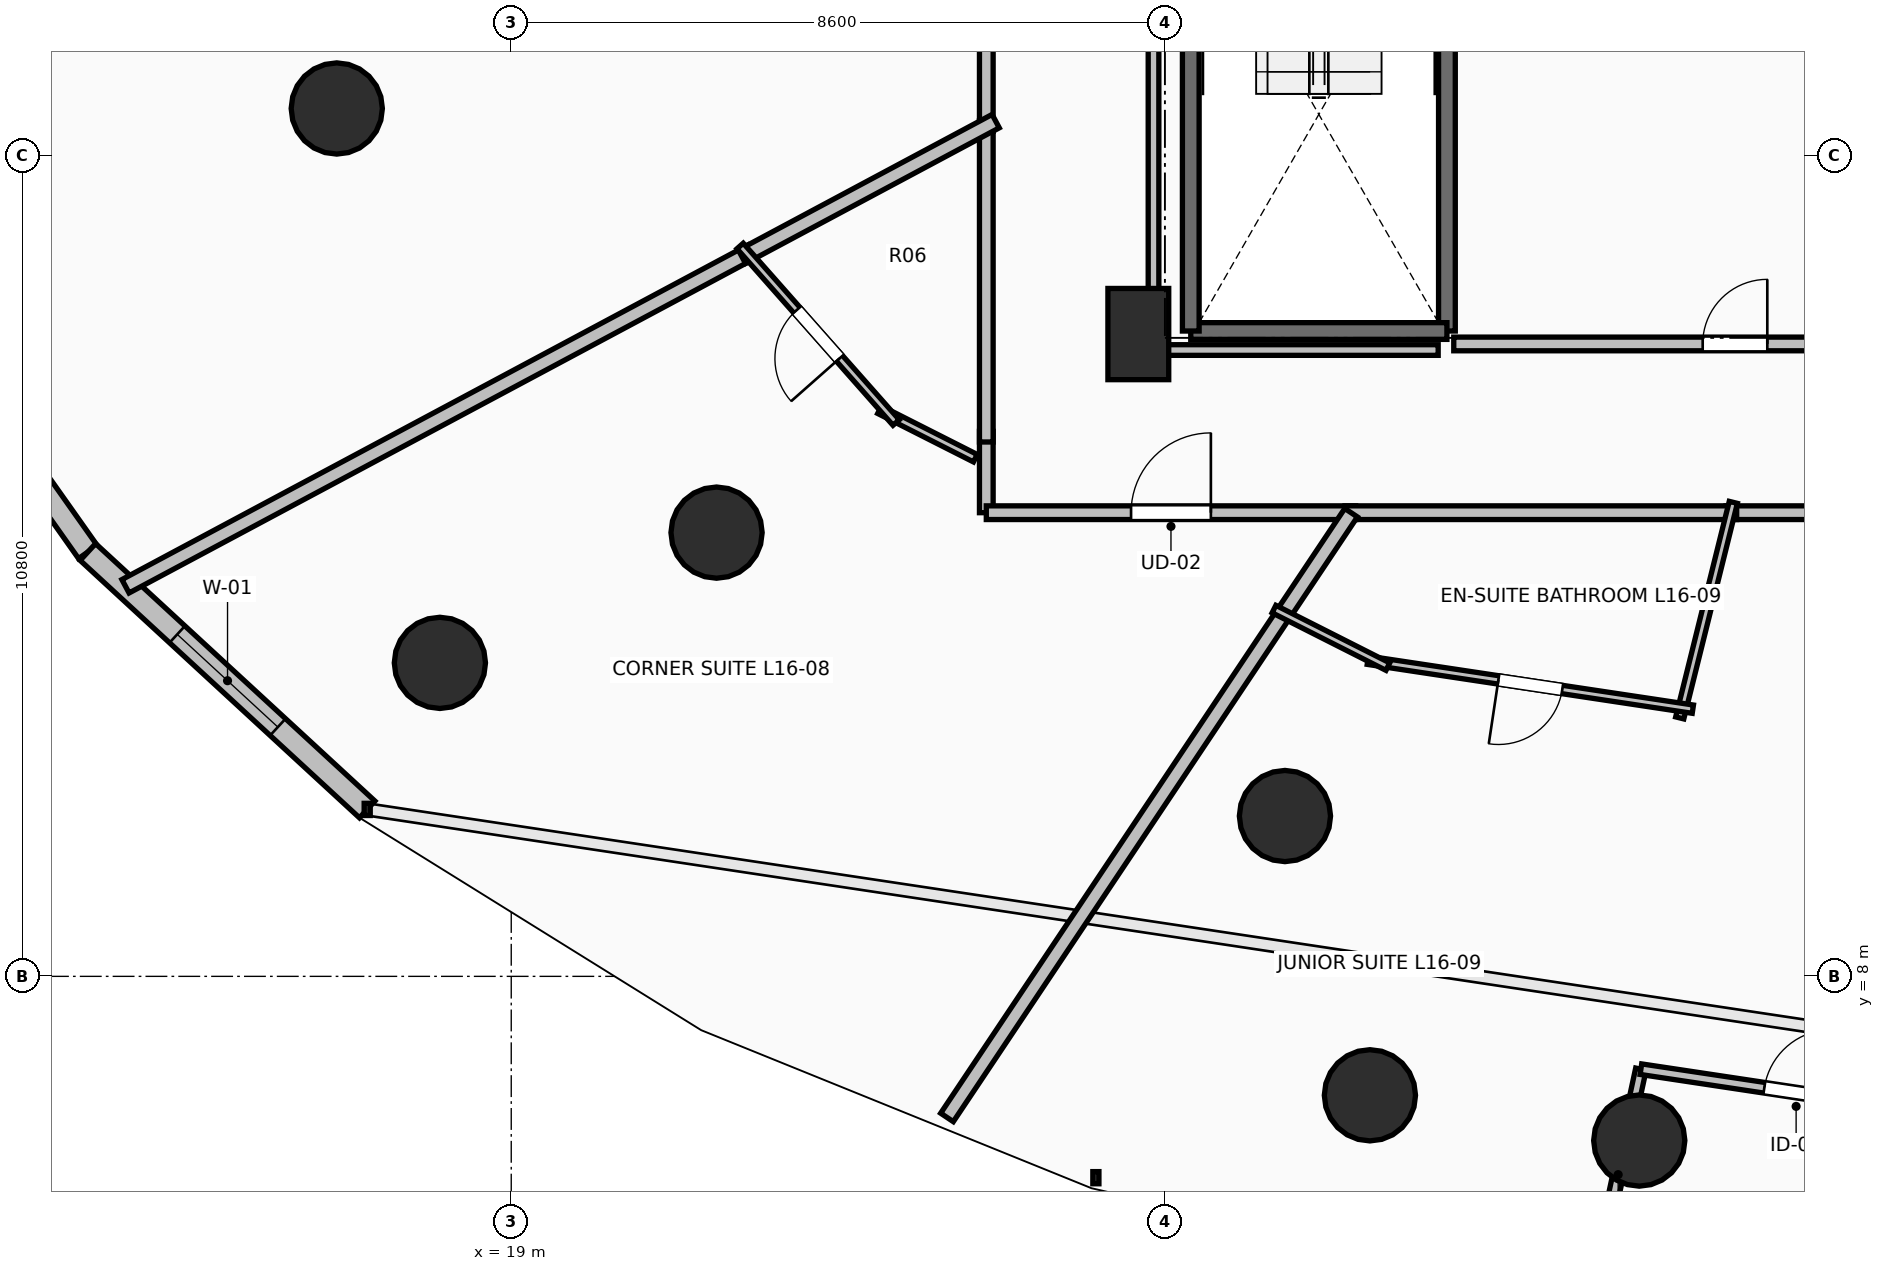
"""IFC4 building model, lengths in metres.
Left out: names, types, materials, properties, quantities, classifications, styles, units other than length and angle.
Written with IfcOpenShell. Run it as: python <this file> out.ifc"""

import sys

from ifc_helpers import new_model, si_unit, direction, frame, frame_2d, origin, origin_2d, place, context, subcontext, project, spatial, rectangle, circle, extrude, element, fill, save


model = new_model("IFC4")
c1 = context("Model", 3, precision=1e-05, world=origin(), true_north=direction((0.0, 1.0)))
c2 = subcontext(c1, "Body", "Model", "MODEL_VIEW")
j1 = project(units=[si_unit("LENGTHUNIT", "METRE"), si_unit("PLANEANGLEUNIT", "RADIAN")], contexts=[c1])
p1 = place(None, origin())
s1 = spatial("IfcSite", under=j1, at=p1, CompositionType="ELEMENT")
p2 = place(p1, origin())
s2 = spatial("IfcBuilding", under=s1, at=p2, CompositionType="ELEMENT")
p3 = place(p2, frame((0.0, 0.0, 62.5)))
s3 = spatial("IfcBuildingStorey", under=s2, at=p3, CompositionType="ELEMENT", Elevation=62.5)
for number, where, z_axis, x_axis in (
    (1, (16.705, 19.418, 0.0), (0.0, 0.0, 1.0), (-0.924, -0.383, 0.0)),
    (2, (21.701, 13.838, 0.0), (0.0, 0.0, 1.0), (-0.707, -0.707, 0.0)),
    (3, (29.179, 10.109, 0.0), (0.0, 0.0, 1.0), (-0.383, -0.924, 0.0)),
    (4, (18.061, 12.124, 0.0), (0.0, 0.0, 1.0), (-0.707, -0.707, 0.0)),
    (5, (30.297, 6.435, 0.0), (0.0, 0.0, 1.0), (-0.383, -0.924, 0.0)),
    (6, (33.84, 5.84, 0.0), (0.0, 0.0, 1.0), (0.0, -1.0, 0.0)),
):
    element("IfcColumn", number, at=place(p3, frame(where, z_axis=z_axis, x_axis=x_axis)), inside=s3, PredefinedType="COLUMN", context=c2, shape_type="SweptSolid", body=[
        extrude(circle(Radius=0.6, at=origin_2d()), origin(), (0.0, 0.0, 1.0), 3.5),
    ])
p4 = place(p3, frame((27.25, 16.45, 0.0), z_axis=(0.0, 0.0, 1.0), x_axis=(1.0, 0.0, 0.0)))
e7 = element("IfcColumn", 7, at=p4, inside=s3, PredefinedType="PILASTER", context=c2, shape_type="SweptSolid", body=[
    extrude(rectangle(XDim=0.8, YDim=1.2, at=origin_2d()), origin(), (0.0, 0.0, 1.0), 3.5),
])
p5 = place(p3, frame((10.699, 17.447, 0.0), z_axis=(0.0, 0.0, 1.0), x_axis=(0.577130815624, -0.816651713803, 0.0)))
e8 = element("IfcWall", 8, at=p5, inside=s3, PredefinedType="STANDARD", context=c2, shape_type="SweptSolid", body=[
    extrude(rectangle(XDim=4.731, YDim=0.3, at=frame_2d((2.366, 0.0))), origin(), (0.0, 0.0, 1.0), 3.24),
])
p6 = place(p3, frame((13.43, 13.583, 0.0), z_axis=(0.0, 0.0, 1.0), x_axis=(0.735342629635, -0.677695519419, 0.0)))
e9 = element("IfcWall", 9, at=p6, inside=s3, PredefinedType="STANDARD", context=c2, shape_type="SweptSolid", body=[
    extrude(rectangle(XDim=4.997, YDim=0.3, at=frame_2d((2.499, 0.0))), origin(), (0.0, 0.0, 1.0), 3.24),
])
p7 = place(p6, frame((1.599, 0.0, 0.85)))
e10 = element("IfcOpeningElement", 10, at=p7, cuts=e9, PredefinedType="OPENING", context=c2, shape_type="SweptSolid", body=[
    extrude(rectangle(XDim=1.8, YDim=2.19, at=frame_2d((0.9, 1.095))), frame((0.0, 0.165, 0.0), z_axis=(0.0, -1.0, 0.0), x_axis=(1.0, 0.0, 0.0)), (0.0, 0.0, 1.0), 0.33),
])
p8 = place(p3, frame((31.31, 23.91, 0.0), z_axis=(0.0, 0.0, 1.0), x_axis=(0.0, -1.0, 0.0)))
e11 = element("IfcWall", 11, at=p8, inside=s3, PredefinedType="SOLIDWALL", context=c2, shape_type="SweptSolid", body=[
    extrude(rectangle(XDim=7.42, YDim=0.22, at=frame_2d((3.71, 0.0))), origin(), (0.0, 0.0, 1.0), 3.24),
])
p9 = place(p3, frame((31.31, 16.49, 0.0), z_axis=(0.0, 0.0, 1.0), x_axis=(-1.0, 0.0, 0.0)))
e12 = element("IfcWall", 12, at=p9, inside=s3, PredefinedType="SOLIDWALL", context=c2, shape_type="SweptSolid", body=[
    extrude(rectangle(XDim=3.37, YDim=0.22, at=frame_2d((1.685, 0.0))), origin(), (0.0, 0.0, 1.0), 3.24),
])
p10 = place(p3, frame((27.94, 16.49, 0.0), z_axis=(0.0, 0.0, 1.0), x_axis=(0.0, 1.0, 0.0)))
e13 = element("IfcWall", 13, at=p10, inside=s3, PredefinedType="SOLIDWALL", context=c2, shape_type="SweptSolid", body=[
    extrude(rectangle(XDim=7.42, YDim=0.22, at=frame_2d((3.71, 0.0))), origin(), (0.0, 0.0, 1.0), 3.24),
])
p11 = place(p3, frame((31.4, 16.32, 0.0), z_axis=(0.0, 0.0, 1.0), x_axis=(1.0, 0.0, 0.0)))
e14 = element("IfcWall", 14, at=p11, inside=s3, PredefinedType="PARTITIONING", context=c2, shape_type="SweptSolid", body=[
    extrude(rectangle(XDim=7.4, YDim=0.18, at=frame_2d((3.7, 0.0))), origin(), (0.0, 0.0, 1.0), 3.24),
])
p12 = place(p11, frame((3.275, 0.0, 0.0)))
e15 = element("IfcOpeningElement", 15, at=p12, cuts=e14, PredefinedType="OPENING", context=c2, shape_type="SweptSolid", body=[
    extrude(rectangle(XDim=0.85, YDim=2.1, at=frame_2d((0.425, 1.05))), frame((0.0, 0.105, 0.0), z_axis=(0.0, -1.0, 0.0), x_axis=(1.0, 0.0, 0.0)), (0.0, 0.0, 1.0), 0.21),
])
p13 = place(p3, frame((25.25, 23.263, 0.0), z_axis=(0.0, 0.0, 1.0), x_axis=(0.0, -1.0, 0.0)))
e16 = element("IfcWall", 16, at=p13, inside=s3, PredefinedType="PARTITIONING", context=c2, shape_type="SweptSolid", body=[
    extrude(rectangle(XDim=4.146, YDim=0.18, at=frame_2d((2.073, 0.0))), origin(), (0.0, 0.0, 1.0), 3.24),
])
p14 = place(p13, frame((1.548, 0.0, 0.0)))
e17 = element("IfcOpeningElement", 17, at=p14, cuts=e16, PredefinedType="OPENING", context=c2, shape_type="SweptSolid", body=[
    extrude(rectangle(XDim=1.05, YDim=2.2, at=frame_2d((0.525, 1.1))), frame((0.0, 0.105, 0.0), z_axis=(0.0, -1.0, 0.0), x_axis=(1.0, 0.0, 0.0)), (0.0, 0.0, 1.0), 0.21),
])
p15 = place(p3, frame((25.25, 15.17, 0.0), z_axis=(0.0, 0.0, 1.0), x_axis=(0.0, -1.0, 0.0)))
e18 = element("IfcWall", 18, at=p15, inside=s3, PredefinedType="PARTITIONING", context=c2, shape_type="SweptSolid", body=[
    extrude(rectangle(XDim=1.07, YDim=0.18, at=frame_2d((0.535, 0.0))), origin(), (0.0, 0.0, 1.0), 2.874),
])
p16 = place(p3, frame((25.25, 14.1, 0.0), z_axis=(0.0, 0.0, 1.0), x_axis=(1.0, 0.0, 0.0)))
e19 = element("IfcWall", 19, at=p16, inside=s3, PredefinedType="PARTITIONING", context=c2, shape_type="SweptSolid", body=[
    extrude(rectangle(XDim=4.859, YDim=0.18, at=frame_2d((2.429, 0.0))), origin(), (0.0, 0.0, 1.0), 2.432),
])
p17 = place(p16, frame((1.905, 0.0, 0.0)))
e20 = element("IfcOpeningElement", 20, at=p17, cuts=e19, PredefinedType="OPENING", context=c2, shape_type="SweptSolid", body=[
    extrude(rectangle(XDim=1.05, YDim=2.2, at=frame_2d((0.525, 1.1))), frame((0.0, 0.105, 0.0), z_axis=(0.0, -1.0, 0.0), x_axis=(1.0, 0.0, 0.0)), (0.0, 0.0, 1.0), 0.21),
])
p18 = place(p3, frame((25.25, 19.257, 0.0), z_axis=(0.0, 0.0, 1.0), x_axis=(0.0, -1.0, 0.0)))
e21 = element("IfcWall", 21, at=p18, inside=s3, PredefinedType="PARTITIONING", context=c2, shape_type="SweptSolid", body=[
    extrude(rectangle(XDim=4.227, YDim=0.18, at=frame_2d((2.114, 0.0))), origin(), (0.0, 0.0, 1.0), 2.432),
])
p19 = place(p3, frame((34.982, 14.1, 0.0), z_axis=(0.0, 0.0, 1.0), x_axis=(1.0, 0.0, 0.0)))
e22 = element("IfcWall", 22, at=p19, inside=s3, PredefinedType="PARTITIONING", context=c2, shape_type="SweptSolid", body=[
    extrude(rectangle(XDim=5.446, YDim=0.18, at=frame_2d((2.723, 0.0))), origin(), (0.0, 0.0, 1.0), 3.24),
])
p20 = place(p19, frame((2.198, 0.0, 0.0)))
e23 = element("IfcOpeningElement", 23, at=p20, cuts=e22, PredefinedType="OPENING", context=c2, shape_type="SweptSolid", body=[
    extrude(rectangle(XDim=1.05, YDim=2.2, at=frame_2d((0.525, 1.1))), frame((0.0, 0.105, 0.0), z_axis=(0.0, -1.0, 0.0), x_axis=(1.0, 0.0, 0.0)), (0.0, 0.0, 1.0), 0.21),
])
p21 = place(p3, frame((29.969, 14.1, 0.0), z_axis=(0.0, 0.0, 1.0), x_axis=(1.0, 0.0, 0.0)))
e24 = element("IfcWall", 24, at=p21, inside=s3, PredefinedType="PARTITIONING", context=c2, shape_type="SweptSolid", body=[
    extrude(rectangle(XDim=5.153, YDim=0.18, at=frame_2d((2.577, 0.0))), origin(), (0.0, 0.0, 1.0), 3.24),
])
p22 = place(p3, frame((13.925, 13.132, 0.0), z_axis=(0.0, 0.0, 1.0), x_axis=(0.881931293807, 0.471377972548, 0.0)))
e25 = element("IfcWall", 25, at=p22, inside=s3, PredefinedType="PARTITIONING", context=c2, shape_type="SweptSolid", body=[
    extrude(rectangle(XDim=9.336, YDim=0.2, at=frame_2d((4.668, 0.0))), origin(), (0.0, 0.0, 1.0), 2.624),
])
p23 = place(p3, frame((22.036, 17.467, 0.0), z_axis=(0.0, 0.0, 1.0), x_axis=(0.881916873027, 0.471404952317, 0.0)))
e26 = element("IfcWall", 26, at=p23, inside=s3, PredefinedType="PARTITIONING", context=c2, shape_type="SweptSolid", body=[
    extrude(rectangle(XDim=3.785, YDim=0.2, at=frame_2d((1.893, 0.0))), origin(), (0.0, 0.0, 1.0), 2.432),
])
p24 = place(p3, frame((25.106, 14.817, 0.0), z_axis=(0.0, 0.0, 1.0), x_axis=(-0.892342346526, 0.451359210161, 0.0)))
e27 = element("IfcWall", 27, at=p24, inside=s3, PredefinedType="PARTITIONING", context=c2, shape_type="SweptSolid", body=[
    extrude(rectangle(XDim=1.412, YDim=0.11, at=frame_2d((0.706, 0.0))), origin(), (0.0, 0.0, 1.0), 2.432),
])
p25 = place(p3, frame((24.064, 15.286, 0.0), z_axis=(0.0, 0.0, 1.0), x_axis=(-0.662165912504, 0.749357260802, 0.0)))
e28 = element("IfcWall", 28, at=p25, inside=s3, PredefinedType="PARTITIONING", context=c2, shape_type="SweptSolid", body=[
    extrude(rectangle(XDim=3.1, YDim=0.11, at=frame_2d((1.55, 0.0))), origin(), (0.0, 0.0, 1.0), 2.874),
])
p26 = place(p25, frame((1.125, 0.0, 0.0)))
e29 = element("IfcOpeningElement", 29, at=p26, cuts=e28, PredefinedType="OPENING", context=c2, shape_type="SweptSolid", body=[
    extrude(rectangle(XDim=0.85, YDim=2.1, at=frame_2d((0.425, 1.05))), frame((0.0, 0.07, 0.0), z_axis=(0.0, -1.0, 0.0), x_axis=(1.0, 0.0, 0.0)), (0.0, 0.0, 1.0), 0.14),
])
p27 = place(p3, frame((24.733, 6.144, 0.0), z_axis=(0.0, 0.0, 1.0), x_axis=(0.555577192504, 0.831464962082, 0.0)))
e30 = element("IfcWall", 30, at=p27, inside=s3, PredefinedType="PARTITIONING", context=c2, shape_type="SweptSolid", body=[
    extrude(rectangle(XDim=9.569, YDim=0.2, at=frame_2d((4.784, 0.0))), origin(), (0.0, 0.0, 1.0), 2.432),
])
p28 = place(p3, frame((35.078, 14.236, 0.0), z_axis=(0.0, 0.0, 1.0), x_axis=(-0.241139515231, -0.97049046064, 0.0)))
e31 = element("IfcWall", 31, at=p28, inside=s3, PredefinedType="PARTITIONING", context=c2, shape_type="SweptSolid", body=[
    extrude(rectangle(XDim=2.922, YDim=0.11, at=frame_2d((1.461, 0.0))), origin(), (0.0, 0.0, 1.0), 2.874),
])
p29 = place(p3, frame((34.545, 11.515, 0.0), z_axis=(0.0, 0.0, 1.0), x_axis=(-0.98886251361, 0.148831882259, 0.0)))
e32 = element("IfcWall", 32, at=p29, inside=s3, PredefinedType="PARTITIONING", context=c2, shape_type="SweptSolid", body=[
    extrude(rectangle(XDim=4.324, YDim=0.11, at=frame_2d((2.162, 0.0))), origin(), (0.0, 0.0, 1.0), 3.24),
])
p30 = place(p29, frame((1.737, 0.0, 0.0)))
e33 = element("IfcOpeningElement", 33, at=p30, cuts=e32, PredefinedType="OPENING", context=c2, shape_type="SweptSolid", body=[
    extrude(rectangle(XDim=0.85, YDim=2.1, at=frame_2d((0.425, 1.05))), frame((0.0, 0.07, 0.0), z_axis=(0.0, -1.0, 0.0), x_axis=(1.0, 0.0, 0.0)), (0.0, 0.0, 1.0), 0.14),
])
p31 = place(p3, frame((30.533, 12.075, 0.0), z_axis=(0.0, 0.0, 1.0), x_axis=(-0.892352223768, 0.451339682209, 0.0)))
e34 = element("IfcWall", 34, at=p31, inside=s3, PredefinedType="PARTITIONING", context=c2, shape_type="SweptSolid", body=[
    extrude(rectangle(XDim=1.678, YDim=0.11, at=frame_2d((0.839, 0.0))), origin(), (0.0, 0.0, 1.0), 2.874),
])
p32 = place(p3, frame((33.264, 4.004, 0.0), z_axis=(0.0, 0.0, 1.0), x_axis=(0.210697687201, 0.977551269555, 0.0)))
e35 = element("IfcWall", 35, at=p32, inside=s3, PredefinedType="PARTITIONING", context=c2, shape_type="SweptSolid", body=[
    extrude(rectangle(XDim=2.839, YDim=0.14, at=frame_2d((1.419, 0.0))), origin(), (0.0, 0.0, 1.0), 3.24),
])
p33 = place(p3, frame((33.862, 6.779, 0.0), z_axis=(0.0, 0.0, 1.0), x_axis=(0.988853606593, -0.148891049857, 0.0)))
e36 = element("IfcWall", 36, at=p33, inside=s3, PredefinedType="PARTITIONING", context=c2, shape_type="SweptSolid", body=[
    extrude(rectangle(XDim=4.185, YDim=0.14, at=frame_2d((2.092, 0.0))), origin(), (0.0, 0.0, 1.0), 2.432),
])
p34 = place(p33, frame((1.642, 0.0, 0.0)))
e37 = element("IfcOpeningElement", 37, at=p34, cuts=e36, PredefinedType="OPENING", context=c2, shape_type="SweptSolid", body=[
    extrude(rectangle(XDim=0.9, YDim=2.1, at=frame_2d((0.45, 1.05))), frame((0.0, 0.085, 0.0), z_axis=(0.0, -1.0, 0.0), x_axis=(1.0, 0.0, 0.0)), (0.0, 0.0, 1.0), 0.17),
])
p35 = place(p3, frame((31.195, 16.24, 0.0), z_axis=(0.0, 0.0, 1.0), x_axis=(-1.0, 0.0, 0.0)))
e38 = element("IfcWall", 38, at=p35, inside=s3, PredefinedType="PARTITIONING", context=c2, shape_type="SweptSolid", body=[
    extrude(rectangle(XDim=3.745, YDim=0.14, at=frame_2d((1.873, 0.0))), origin(), (0.0, 0.0, 1.0), 2.432),
])
p36 = place(p3, frame((27.45, 16.24, 0.0), z_axis=(0.0, 0.0, 1.0), x_axis=(0.0, 1.0, 0.0)))
e39 = element("IfcWall", 39, at=p36, inside=s3, PredefinedType="PARTITIONING", context=c2, shape_type="SweptSolid", body=[
    extrude(rectangle(XDim=7.514, YDim=0.14, at=frame_2d((3.757, 0.0))), origin(), (0.0, 0.0, 1.0), 2.432),
])
p37 = place(p7, origin())
e40 = element("IfcWindow", 40, at=p37, inside=s3, PartitioningType="SINGLE_PANEL", PredefinedType="WINDOW", context=c2, shape_type="SweptSolid", body=[
    extrude(rectangle(XDim=1.8, YDim=2.19, at=frame_2d((0.9, 1.095))), frame((0.0, 0.03, 0.0), z_axis=(0.0, -1.0, 0.0), x_axis=(1.0, 0.0, 0.0)), (0.0, 0.0, 1.0), 0.06),
])
fill(e10, e40)
p38 = place(p12, origin())
e41 = element("IfcDoor", 41, at=p38, inside=s3, OperationType="SINGLE_SWING_RIGHT", PredefinedType="DOOR", context=c2, shape_type="SweptSolid", body=[
    extrude(rectangle(XDim=0.85, YDim=2.1, at=frame_2d((0.425, 1.05))), frame((0.0, 0.025, 0.0), z_axis=(0.0, -1.0, 0.0), x_axis=(1.0, 0.0, 0.0)), (0.0, 0.0, 1.0), 0.05),
])
fill(e15, e41)
p39 = place(p17, origin())
e42 = element("IfcDoor", 42, at=p39, inside=s3, OperationType="SINGLE_SWING_RIGHT", PredefinedType="DOOR", context=c2, shape_type="SweptSolid", body=[
    extrude(rectangle(XDim=1.05, YDim=2.2, at=frame_2d((0.525, 1.1))), frame((0.0, 0.025, 0.0), z_axis=(0.0, -1.0, 0.0), x_axis=(1.0, 0.0, 0.0)), (0.0, 0.0, 1.0), 0.05),
])
fill(e20, e42)
p40 = place(p26, origin())
e43 = element("IfcDoor", 43, at=p40, inside=s3, OperationType="SINGLE_SWING_LEFT", PredefinedType="DOOR", context=c2, shape_type="SweptSolid", body=[
    extrude(rectangle(XDim=0.85, YDim=2.1, at=frame_2d((0.425, 1.05))), frame((0.0, 0.025, 0.0), z_axis=(0.0, -1.0, 0.0), x_axis=(1.0, 0.0, 0.0)), (0.0, 0.0, 1.0), 0.05),
])
fill(e29, e43)
p41 = place(p30, origin())
e44 = element("IfcDoor", 44, at=p41, inside=s3, OperationType="SINGLE_SWING_RIGHT", PredefinedType="DOOR", context=c2, shape_type="SweptSolid", body=[
    extrude(rectangle(XDim=0.85, YDim=2.1, at=frame_2d((0.425, 1.05))), frame((0.0, 0.025, 0.0), z_axis=(0.0, -1.0, 0.0), x_axis=(1.0, 0.0, 0.0)), (0.0, 0.0, 1.0), 0.05),
])
fill(e33, e44)
p42 = place(p34, origin())
e45 = element("IfcDoor", 45, at=p42, inside=s3, OperationType="SINGLE_SWING_RIGHT", PredefinedType="DOOR", context=c2, shape_type="SweptSolid", body=[
    extrude(rectangle(XDim=0.9, YDim=2.1, at=frame_2d((0.45, 1.05))), frame((0.0, 0.025, 0.0), z_axis=(0.0, -1.0, 0.0), x_axis=(1.0, 0.0, 0.0)), (0.0, 0.0, 1.0), 0.05),
])
fill(e37, e45)
save(model, sys.argv[1])
